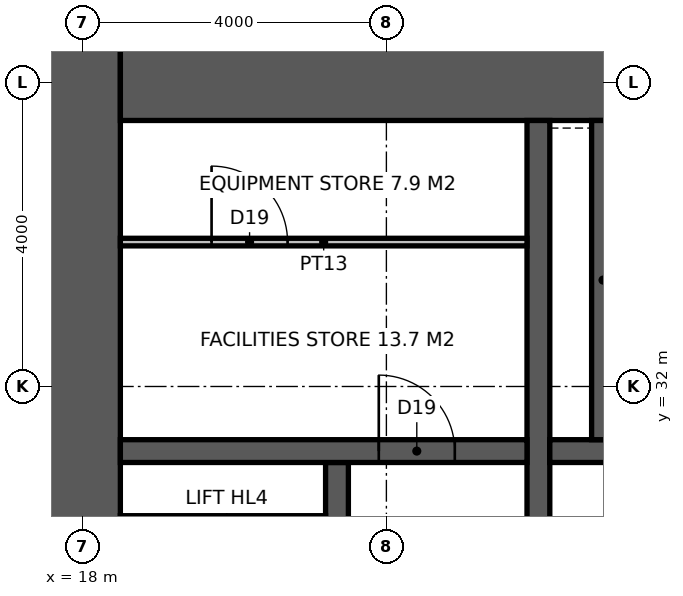
"""IFC4 building model, lengths in metres.
Left out: names, types, materials, properties, quantities, classifications, styles, units other than length and angle.
Written with IfcOpenShell. Run it as: python <this file> out.ifc"""

import sys

from ifc_helpers import new_model, si_unit, direction, frame, frame_2d, origin, place, context, subcontext, project, spatial, rectangle, extrude, element, fill, save


model = new_model("IFC4")
c1 = context("Model", 3, precision=1e-05, world=origin(), true_north=direction((0.0, 1.0)))
c2 = subcontext(c1, "Body", "Model", "MODEL_VIEW")
j1 = project(units=[si_unit("LENGTHUNIT", "METRE"), si_unit("PLANEANGLEUNIT", "RADIAN")], contexts=[c1])
p1 = place(None, origin())
s1 = spatial("IfcSite", under=j1, at=p1, CompositionType="ELEMENT")
p2 = place(p1, origin())
s2 = spatial("IfcBuilding", under=s1, at=p2, CompositionType="ELEMENT")
p3 = place(p2, frame((0.0, 0.0, 147.8)))
s3 = spatial("IfcBuildingStorey", under=s2, at=p3, CompositionType="ELEMENT", Elevation=147.8)
p4 = place(p3, frame((18.0, 17.5, -0.15), z_axis=(0.0, 0.0, 1.0), x_axis=(0.0, 1.0, 0.0)))
e1 = element("IfcWall", 1, at=p4, inside=s3, PredefinedType="SHEAR", context=c2, shape_type="SweptSolid", body=[
    extrude(rectangle(XDim=19.0, YDim=1.0, at=frame_2d((9.5, 0.0))), origin(), (0.0, 0.0, 1.0), 4.0),
])
p5 = place(p3, frame((18.5, 36.0, -0.15), z_axis=(0.0, 0.0, 1.0), x_axis=(1.0, 0.0, 0.0)))
e2 = element("IfcWall", 2, at=p5, inside=s3, PredefinedType="SHEAR", context=c2, shape_type="SweptSolid", body=[
    extrude(rectangle(XDim=17.6, YDim=1.0, at=frame_2d((8.8, 0.0))), origin(), (0.0, 0.0, 1.0), 4.0),
])
p6 = place(p3, frame((24.0, 18.5, -0.15), z_axis=(0.0, 0.0, 1.0), x_axis=(0.0, 1.0, 0.0)))
e3 = element("IfcWall", 3, at=p6, inside=s3, PredefinedType="SHEAR", context=c2, shape_type="SweptSolid", body=[
    extrude(rectangle(XDim=17.0, YDim=0.3, at=frame_2d((8.5, 0.0))), origin(), (0.0, 0.0, 1.0), 4.0),
])
p7 = place(p6, frame((9.6, 0.0, 0.15)))
e4 = element("IfcOpeningElement", 4, at=p7, cuts=e3, PredefinedType="OPENING", context=c2, shape_type="SweptSolid", body=[
    extrude(rectangle(XDim=1.5, YDim=2.4, at=frame_2d((0.75, 1.2))), frame((0.0, 0.16, 0.0), z_axis=(0.0, -1.0, 0.0), x_axis=(1.0, 0.0, 0.0)), (0.0, 0.0, 1.0), 0.32),
])
p8 = place(p3, frame((24.15, 31.15, -0.15), z_axis=(0.0, 0.0, 1.0), x_axis=(1.0, 0.0, 0.0)))
e5 = element("IfcWall", 5, at=p8, inside=s3, PredefinedType="SHEAR", context=c2, shape_type="SweptSolid", body=[
    extrude(rectangle(XDim=11.25, YDim=0.3, at=frame_2d((5.625, 0.0))), origin(), (0.0, 0.0, 1.0), 4.0),
])
p9 = place(p8, frame((7.25, 0.0, 0.15)))
e6 = element("IfcOpeningElement", 6, at=p9, cuts=e5, PredefinedType="OPENING", context=c2, shape_type="SweptSolid", body=[
    extrude(rectangle(XDim=1.4, YDim=2.4, at=frame_2d((0.7, 1.2))), frame((0.0, 0.16, 0.0), z_axis=(0.0, -1.0, 0.0), x_axis=(1.0, 0.0, 0.0)), (0.0, 0.0, 1.0), 0.32),
])
p10 = place(p3, frame((21.35, 18.5, -0.15), z_axis=(0.0, 0.0, 1.0), x_axis=(0.0, 1.0, 0.0)))
e7 = element("IfcWall", 7, at=p10, inside=s3, PredefinedType="SHEAR", context=c2, shape_type="SweptSolid", body=[
    extrude(rectangle(XDim=12.5, YDim=0.3, at=frame_2d((6.25, 0.0))), origin(), (0.0, 0.0, 1.0), 4.0),
])
p11 = place(p10, frame((0.875, 0.0, 0.15)))
e8 = element("IfcOpeningElement", 8, at=p11, cuts=e7, PredefinedType="OPENING", context=c2, shape_type="SweptSolid", body=[
    extrude(rectangle(XDim=1.1, YDim=2.2, at=frame_2d((0.55, 1.1))), frame((0.0, 0.16, 0.0), z_axis=(0.0, -1.0, 0.0), x_axis=(1.0, 0.0, 0.0)), (0.0, 0.0, 1.0), 0.32),
])
p12 = place(p10, frame((3.825, 0.0, 0.15)))
e9 = element("IfcOpeningElement", 9, at=p12, cuts=e7, PredefinedType="OPENING", context=c2, shape_type="SweptSolid", body=[
    extrude(rectangle(XDim=1.1, YDim=2.2, at=frame_2d((0.55, 1.1))), frame((0.0, 0.16, 0.0), z_axis=(0.0, -1.0, 0.0), x_axis=(1.0, 0.0, 0.0)), (0.0, 0.0, 1.0), 0.32),
])
p13 = place(p10, frame((6.675, 0.0, 0.15)))
e10 = element("IfcOpeningElement", 10, at=p13, cuts=e7, PredefinedType="OPENING", context=c2, shape_type="SweptSolid", body=[
    extrude(rectangle(XDim=1.1, YDim=2.2, at=frame_2d((0.55, 1.1))), frame((0.0, 0.16, 0.0), z_axis=(0.0, -1.0, 0.0), x_axis=(1.0, 0.0, 0.0)), (0.0, 0.0, 1.0), 0.32),
])
p14 = place(p10, frame((9.575, 0.0, 0.15)))
e11 = element("IfcOpeningElement", 11, at=p14, cuts=e7, PredefinedType="OPENING", context=c2, shape_type="SweptSolid", body=[
    extrude(rectangle(XDim=1.1, YDim=2.2, at=frame_2d((0.55, 1.1))), frame((0.0, 0.16, 0.0), z_axis=(0.0, -1.0, 0.0), x_axis=(1.0, 0.0, 0.0)), (0.0, 0.0, 1.0), 0.32),
])
p15 = place(p3, frame((18.5, 31.15, -0.15), z_axis=(0.0, 0.0, 1.0), x_axis=(1.0, 0.0, 0.0)))
e12 = element("IfcWall", 12, at=p15, inside=s3, PredefinedType="SHEAR", context=c2, shape_type="SweptSolid", body=[
    extrude(rectangle(XDim=5.35, YDim=0.3, at=frame_2d((2.675, 0.0))), origin(), (0.0, 0.0, 1.0), 4.0),
])
p16 = place(p15, frame((3.4, 0.0, 0.15)))
e13 = element("IfcOpeningElement", 13, at=p16, cuts=e12, PredefinedType="OPENING", context=c2, shape_type="SweptSolid", body=[
    extrude(rectangle(XDim=1.0, YDim=2.2, at=frame_2d((0.5, 1.1))), frame((0.0, 0.16, 0.0), z_axis=(0.0, -1.0, 0.0), x_axis=(1.0, 0.0, 0.0)), (0.0, 0.0, 1.0), 0.32),
])
p17 = place(p3, frame((24.85, 31.3, -0.15), z_axis=(0.0, 0.0, 1.0), x_axis=(0.0, 1.0, 0.0)))
e14 = element("IfcWall", 14, at=p17, inside=s3, PredefinedType="SHEAR", context=c2, shape_type="SweptSolid", body=[
    extrude(rectangle(XDim=4.2, YDim=0.3, at=frame_2d((2.1, 0.0))), origin(), (0.0, 0.0, 1.0), 4.0),
])
p18 = place(p3, frame((18.5, 33.9, 0.0), z_axis=(0.0, 0.0, 1.0), x_axis=(1.0, 0.0, 0.0)))
e15 = element("IfcWall", 15, at=p18, inside=s3, PredefinedType="PARTITIONING", context=c2, shape_type="SweptSolid", body=[
    extrude(rectangle(XDim=5.35, YDim=0.1, at=frame_2d((2.675, 0.0))), origin(), (0.0, 0.0, 1.0), 3.85),
])
p19 = place(p18, frame((1.2, 0.0, 0.0)))
e16 = element("IfcOpeningElement", 16, at=p19, cuts=e15, PredefinedType="OPENING", context=c2, shape_type="SweptSolid", body=[
    extrude(rectangle(XDim=1.0, YDim=2.2, at=frame_2d((0.5, 1.1))), frame((0.0, 0.06, 0.0), z_axis=(0.0, -1.0, 0.0), x_axis=(1.0, 0.0, 0.0)), (0.0, 0.0, 1.0), 0.12),
])
p20 = place(p16, origin())
e17 = element("IfcDoor", 17, at=p20, inside=s3, OperationType="SINGLE_SWING_LEFT", PredefinedType="DOOR", context=c2, shape_type="SweptSolid", body=[
    extrude(rectangle(XDim=1.0, YDim=2.2, at=frame_2d((0.5, 1.1))), frame((0.0, 0.025, 0.0), z_axis=(0.0, -1.0, 0.0), x_axis=(1.0, 0.0, 0.0)), (0.0, 0.0, 1.0), 0.05),
])
fill(e13, e17)
p21 = place(p19, origin())
e18 = element("IfcDoor", 18, at=p21, inside=s3, OperationType="SINGLE_SWING_LEFT", PredefinedType="DOOR", context=c2, shape_type="SweptSolid", body=[
    extrude(rectangle(XDim=1.0, YDim=2.2, at=frame_2d((0.5, 1.1))), frame((0.0, 0.025, 0.0), z_axis=(0.0, -1.0, 0.0), x_axis=(1.0, 0.0, 0.0)), (0.0, 0.0, 1.0), 0.05),
])
fill(e16, e18)
save(model, sys.argv[1])
